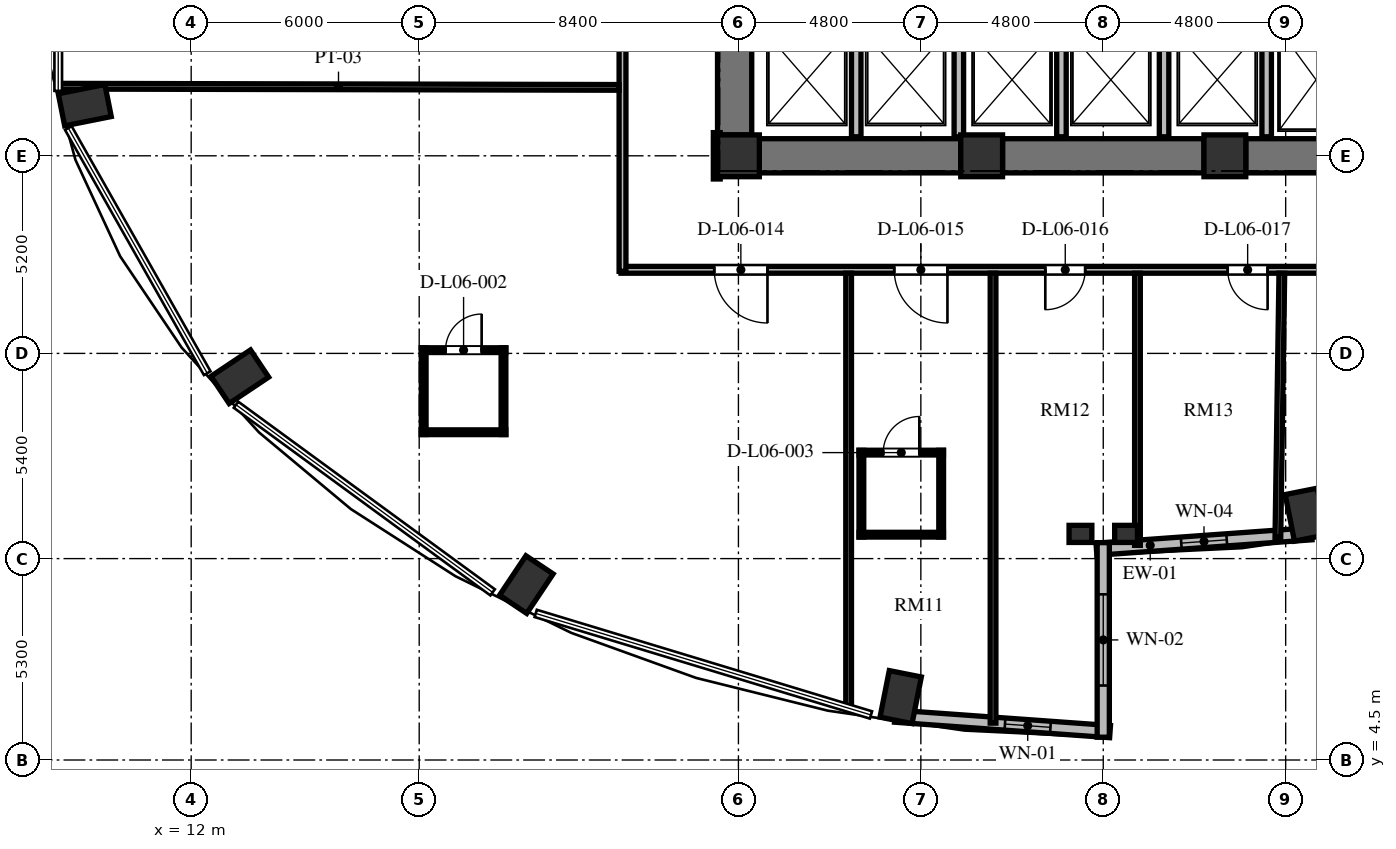
"""IFC4 building model, lengths in metres.
Left out: names, types, materials, properties, quantities, classifications, styles, units other than length and angle.
Written with IfcOpenShell. Run it as: python <this file> out.ifc"""

import sys

from ifc_helpers import new_model, si_unit, direction, frame, frame_2d, origin, origin_2d, place, context, subcontext, project, spatial, rectangle, extrude, element, fill, save


model = new_model("IFC4")
c1 = context("Model", 3, precision=1e-05, world=origin(), true_north=direction((0.0, 1.0)))
c2 = subcontext(c1, "Body", "Model", "MODEL_VIEW")
j1 = project(units=[si_unit("LENGTHUNIT", "METRE"), si_unit("PLANEANGLEUNIT", "RADIAN")], contexts=[c1])
p1 = place(None, origin())
s1 = spatial("IfcSite", under=j1, at=p1, CompositionType="ELEMENT")
p2 = place(p1, origin())
s2 = spatial("IfcBuilding", under=s1, at=p2, CompositionType="ELEMENT")
p3 = place(p2, frame((0.0, 0.0, 28.848)))
s3 = spatial("IfcBuildingStorey", under=s2, at=p3, CompositionType="ELEMENT", Elevation=28.848)
for number, where, z_axis, x_axis in (
    (1, (41.331, 10.956, 0.0), (0.0, 0.0, 1.0), (0.195, -0.981, 0.0)),
    (2, (9.2, 21.732, 0.0), (0.0, 0.0, 1.0), (-0.981, -0.195, 0.0)),
    (3, (13.28, 14.586, 0.0), (0.0, 0.0, 1.0), (-0.831, -0.556, 0.0)),
    (4, (20.819, 9.116, 0.0), (0.0, 0.0, 1.0), (-0.556, -0.831, 0.0)),
    (5, (30.669, 6.156, 0.0), (0.0, 0.0, 1.0), (-0.195, -0.981, 0.0)),
):
    element("IfcColumn", number, at=place(p3, frame(where, z_axis=z_axis, x_axis=x_axis)), inside=s3, PredefinedType="COLUMN", context=c2, shape_type="SweptSolid", body=[
        extrude(rectangle(XDim=1.25, YDim=0.86, at=origin_2d()), origin(), (0.0, 0.0, 1.0), 3.648),
    ])
for number, where, z_axis, x_axis in (
    (6, (26.4, 20.4, 0.0), (0.0, 0.0, 1.0), (1.0, 0.0, 0.0)),
    (7, (32.8, 20.4, 0.0), (0.0, 0.0, 1.0), (1.0, 0.0, 0.0)),
    (8, (39.2, 20.4, 0.0), (0.0, 0.0, 1.0), (1.0, 0.0, 0.0)),
):
    element("IfcColumn", number, at=place(p3, frame(where, z_axis=z_axis, x_axis=x_axis)), inside=s3, PredefinedType="COLUMN", context=c2, shape_type="SweptSolid", body=[
        extrude(rectangle(XDim=1.1, YDim=1.1, at=origin_2d()), origin(), (0.0, 0.0, 1.0), 3.648),
    ])
for number, where, z_axis, x_axis in (
    (9, (35.4, 10.45, 0.0), (0.0, 0.0, 1.0), (1.0, 0.0, 0.0)),
    (10, (36.6, 10.45, 0.0), (0.0, 0.0, 1.0), (1.0, 0.0, 0.0)),
):
    element("IfcColumn", number, at=place(p3, frame(where, z_axis=z_axis, x_axis=x_axis)), inside=s3, PredefinedType="PILASTER", context=c2, shape_type="SweptSolid", body=[
        extrude(rectangle(XDim=0.6, YDim=0.45, at=origin_2d()), origin(), (0.0, 0.0, 1.0), 3.648),
    ])
p4 = place(p3, frame((26.3, 20.95, 0.0), z_axis=(0.0, 0.0, 1.0), x_axis=(0.0, 1.0, 0.0)))
e11 = element("IfcWall", 11, at=p4, inside=s3, PredefinedType="SHEAR", context=c2, shape_type="SweptSolid", body=[
    extrude(rectangle(XDim=14.1, YDim=0.9, at=frame_2d((7.05, 0.0))), origin(), (0.0, 0.0, 1.0), 3.648),
])
p5 = place(p4, frame((6.5, 0.0, 0.0)))
e12 = element("IfcOpeningElement", 12, at=p5, cuts=e11, PredefinedType="OPENING", context=c2, shape_type="SweptSolid", body=[
    extrude(rectangle(XDim=1.2, YDim=2.15, at=frame_2d((0.6, 1.075))), frame((0.0, 0.46, 0.0), z_axis=(0.0, -1.0, 0.0), x_axis=(1.0, 0.0, 0.0)), (0.0, 0.0, 1.0), 0.92),
])
p6 = place(p4, frame((9.6, 0.0, 0.0)))
e13 = element("IfcOpeningElement", 13, at=p6, cuts=e11, PredefinedType="OPENING", context=c2, shape_type="SweptSolid", body=[
    extrude(rectangle(XDim=1.3, YDim=2.2, at=frame_2d((0.65, 1.1))), frame((0.0, 0.46, 0.0), z_axis=(0.0, -1.0, 0.0), x_axis=(1.0, 0.0, 0.0)), (0.0, 0.0, 1.0), 0.92),
])
p7 = place(p4, frame((3.26, 0.0, 0.0)))
e14 = element("IfcOpeningElement", 14, at=p7, cuts=e11, PredefinedType="OPENING", context=c2, shape_type="SweptSolid", body=[
    extrude(rectangle(XDim=1.3, YDim=2.2, at=frame_2d((0.65, 1.1))), frame((0.0, 0.46, 0.0), z_axis=(0.0, -1.0, 0.0), x_axis=(1.0, 0.0, 0.0)), (0.0, 0.0, 1.0), 0.92),
])
p8 = place(p3, frame((26.95, 20.4, 0.0), z_axis=(0.0, 0.0, 1.0), x_axis=(1.0, 0.0, 0.0)))
e15 = element("IfcWall", 15, at=p8, inside=s3, PredefinedType="SHEAR", context=c2, shape_type="SweptSolid", body=[
    extrude(rectangle(XDim=5.3, YDim=0.9, at=frame_2d((2.65, 0.0))), origin(), (0.0, 0.0, 1.0), 3.648),
])
p9 = place(p3, frame((33.35, 20.4, 0.0), z_axis=(0.0, 0.0, 1.0), x_axis=(1.0, 0.0, 0.0)))
e16 = element("IfcWall", 16, at=p9, inside=s3, PredefinedType="SHEAR", context=c2, shape_type="SweptSolid", body=[
    extrude(rectangle(XDim=5.3, YDim=0.9, at=frame_2d((2.65, 0.0))), origin(), (0.0, 0.0, 1.0), 3.648),
])
p10 = place(p3, frame((39.75, 20.4, 0.0), z_axis=(0.0, 0.0, 1.0), x_axis=(1.0, 0.0, 0.0)))
e17 = element("IfcWall", 17, at=p10, inside=s3, PredefinedType="SHEAR", context=c2, shape_type="SweptSolid", body=[
    extrude(rectangle(XDim=5.3, YDim=0.9, at=frame_2d((2.65, 0.0))), origin(), (0.0, 0.0, 1.0), 3.648),
])
p11 = place(p3, frame((35.821, 10.047, 0.0), z_axis=(0.0, 0.0, 1.0), x_axis=(0.997422321809, 0.071754525696, 0.0)))
e18 = element("IfcWall", 18, at=p11, inside=s3, PredefinedType="SOLIDWALL", context=c2, shape_type="SweptSolid", body=[
    extrude(rectangle(XDim=5.675, YDim=0.32, at=frame_2d((2.838, 0.0))), origin(), (0.0, 0.0, 1.0), 3.428),
])
p12 = place(p11, frame((2.238, 0.0, 0.85)))
e19 = element("IfcOpeningElement", 19, at=p12, cuts=e18, PredefinedType="OPENING", context=c2, shape_type="SweptSolid", body=[
    extrude(rectangle(XDim=1.2, YDim=1.8, at=frame_2d((0.6, 0.9))), frame((0.0, 0.17, 0.0), z_axis=(0.0, -1.0, 0.0), x_axis=(1.0, 0.0, 0.0)), (0.0, 0.0, 1.0), 0.34),
])
p13 = place(p3, frame((30.519, 5.654, 0.0), z_axis=(0.0, 0.0, 1.0), x_axis=(0.997421878774, -0.071760683825, 0.0)))
e20 = element("IfcWall", 20, at=p13, inside=s3, PredefinedType="SOLIDWALL", context=c2, shape_type="SweptSolid", body=[
    extrude(rectangle(XDim=5.675, YDim=0.32, at=frame_2d((2.837, 0.0))), origin(), (0.0, 0.0, 1.0), 3.428),
])
p14 = place(p13, frame((2.903, 0.0, 0.85)))
e21 = element("IfcOpeningElement", 21, at=p14, cuts=e20, PredefinedType="OPENING", context=c2, shape_type="SweptSolid", body=[
    extrude(rectangle(XDim=1.2, YDim=2.2, at=frame_2d((0.6, 1.1))), frame((0.0, 0.17, 0.0), z_axis=(0.0, -1.0, 0.0), x_axis=(1.0, 0.0, 0.0)), (0.0, 0.0, 1.0), 0.34),
])
p15 = place(p3, frame((36.0, 5.1, 0.0), z_axis=(0.0, 0.0, 1.0), x_axis=(0.0, 1.0, 0.0)))
e22 = element("IfcWall", 22, at=p15, inside=s3, PredefinedType="SOLIDWALL", context=c2, shape_type="SweptSolid", body=[
    extrude(rectangle(XDim=5.12, YDim=0.32, at=frame_2d((2.56, 0.0))), origin(), (0.0, 0.0, 1.0), 3.428),
])
p16 = place(p15, frame((1.36, 0.0, 0.84)))
e23 = element("IfcOpeningElement", 23, at=p16, cuts=e22, PredefinedType="OPENING", context=c2, shape_type="SweptSolid", body=[
    extrude(rectangle(XDim=2.4, YDim=2.04, at=frame_2d((1.2, 1.02))), frame((0.0, 0.17, 0.0), z_axis=(0.0, -1.0, 0.0), x_axis=(1.0, 0.0, 0.0)), (0.0, 0.0, 1.0), 0.34),
])
for number, where, z_axis, x_axis in (
    (24, (29.5, 20.9, 0.0), (0.0, 0.0, 1.0), (0.0, 1.0, 0.0)),
    (25, (32.2, 20.9, 0.0), (0.0, 0.0, 1.0), (0.0, 1.0, 0.0)),
    (26, (34.9, 20.9, 0.0), (0.0, 0.0, 1.0), (0.0, 1.0, 0.0)),
    (27, (37.6, 20.9, 0.0), (0.0, 0.0, 1.0), (0.0, 1.0, 0.0)),
    (28, (40.3, 20.9, 0.0), (0.0, 0.0, 1.0), (0.0, 1.0, 0.0)),
):
    element("IfcWall", number, at=place(p3, frame(where, z_axis=z_axis, x_axis=x_axis)), inside=s3, PredefinedType="SOLIDWALL", context=c2, shape_type="SweptSolid", body=[
        extrude(rectangle(XDim=2.8, YDim=0.25, at=frame_2d((1.4, 0.0))), origin(), (0.0, 0.0, 1.0), 3.428),
    ])
p17 = place(p3, frame((25.83, 21.01, 0.0), z_axis=(0.0, 0.0, 1.0), x_axis=(0.0, -1.0, 0.0)))
e29 = element("IfcWall", 29, at=p17, inside=s3, PredefinedType="PARTITIONING", context=c2, shape_type="SweptSolid", body=[
    extrude(rectangle(XDim=1.22, YDim=0.18, at=frame_2d((0.61, 0.0))), origin(), (0.0, 0.0, 1.0), 3.428),
])
p18 = place(p3, frame((45.24, 17.4, 0.0), z_axis=(0.0, 0.0, 1.0), x_axis=(-1.0, 0.0, 0.0)))
e30 = element("IfcWall", 30, at=p18, inside=s3, PredefinedType="PARTITIONING", context=c2, shape_type="SweptSolid", body=[
    extrude(rectangle(XDim=21.93, YDim=0.18, at=frame_2d((10.965, 0.0))), origin(), (0.0, 0.0, 1.0), 3.053),
])
p19 = place(p18, frame((18.076, 0.0, 0.0)))
e31 = element("IfcOpeningElement", 31, at=p19, cuts=e30, PredefinedType="OPENING", context=c2, shape_type="SweptSolid", body=[
    extrude(rectangle(XDim=1.4, YDim=2.2, at=frame_2d((0.7, 1.1))), frame((0.0, 0.1, 0.0), z_axis=(0.0, -1.0, 0.0), x_axis=(1.0, 0.0, 0.0)), (0.0, 0.0, 1.0), 0.2),
])
p20 = place(p18, frame((13.34, 0.0, 0.0)))
e32 = element("IfcOpeningElement", 32, at=p20, cuts=e30, PredefinedType="OPENING", context=c2, shape_type="SweptSolid", body=[
    extrude(rectangle(XDim=1.4, YDim=2.2, at=frame_2d((0.7, 1.1))), frame((0.0, 0.1, 0.0), z_axis=(0.0, -1.0, 0.0), x_axis=(1.0, 0.0, 0.0)), (0.0, 0.0, 1.0), 0.2),
])
p21 = place(p18, frame((9.715, 0.0, 0.0)))
e33 = element("IfcOpeningElement", 33, at=p21, cuts=e30, PredefinedType="OPENING", context=c2, shape_type="SweptSolid", body=[
    extrude(rectangle(XDim=1.05, YDim=2.15, at=frame_2d((0.525, 1.075))), frame((0.0, 0.1, 0.0), z_axis=(0.0, -1.0, 0.0), x_axis=(1.0, 0.0, 0.0)), (0.0, 0.0, 1.0), 0.2),
])
p22 = place(p18, frame((4.916, 0.0, 0.0)))
e34 = element("IfcOpeningElement", 34, at=p22, cuts=e30, PredefinedType="OPENING", context=c2, shape_type="SweptSolid", body=[
    extrude(rectangle(XDim=1.05, YDim=2.15, at=frame_2d((0.525, 1.075))), frame((0.0, 0.1, 0.0), z_axis=(0.0, -1.0, 0.0), x_axis=(1.0, 0.0, 0.0)), (0.0, 0.0, 1.0), 0.2),
])
p23 = place(p18, frame((1.729, 0.0, 0.0)))
e35 = element("IfcOpeningElement", 35, at=p23, cuts=e30, PredefinedType="OPENING", context=c2, shape_type="SweptSolid", body=[
    extrude(rectangle(XDim=1.4, YDim=2.2, at=frame_2d((0.7, 1.1))), frame((0.0, 0.1, 0.0), z_axis=(0.0, -1.0, 0.0), x_axis=(1.0, 0.0, 0.0)), (0.0, 0.0, 1.0), 0.2),
])
p24 = place(p3, frame((23.35, 17.36, 0.0), z_axis=(0.0, 0.0, 1.0), x_axis=(0.0, 1.0, 0.0)))
e36 = element("IfcWall", 36, at=p24, inside=s3, PredefinedType="PARTITIONING", context=c2, shape_type="SweptSolid", body=[
    extrude(rectangle(XDim=9.28, YDim=0.18, at=frame_2d((4.64, 0.0))), origin(), (0.0, 0.0, 1.0), 3.428),
])
p25 = place(p3, frame((8.493, 22.231, 0.0), z_axis=(0.0, 0.0, 1.0), x_axis=(0.999997760873, -0.002116187438, 0.0)))
e37 = element("IfcWall", 37, at=p25, inside=s3, PredefinedType="PARTITIONING", context=c2, shape_type="SweptSolid", body=[
    extrude(rectangle(XDim=14.767, YDim=0.15, at=frame_2d((7.384, 0.0))), origin(), (0.0, 0.0, 1.0), 3.428),
])
p26 = place(p3, frame((29.3, 5.876, 0.0), z_axis=(0.0, 0.0, 1.0), x_axis=(0.0, 1.0, 0.0)))
e38 = element("IfcWall", 38, at=p26, inside=s3, PredefinedType="PARTITIONING", context=c2, shape_type="SweptSolid", body=[
    extrude(rectangle(XDim=11.434, YDim=0.15, at=frame_2d((5.717, 0.0))), origin(), (0.0, 0.0, 1.0), 3.428),
])
p27 = place(p3, frame((33.1, 5.471, 0.0), z_axis=(0.0, 0.0, 1.0), x_axis=(0.0, 1.0, 0.0)))
e39 = element("IfcWall", 39, at=p27, inside=s3, PredefinedType="PARTITIONING", context=c2, shape_type="SweptSolid", body=[
    extrude(rectangle(XDim=11.839, YDim=0.15, at=frame_2d((5.919, 0.0))), origin(), (0.0, 0.0, 1.0), 3.428),
])
p28 = place(p3, frame((36.9, 10.15, 0.0), z_axis=(0.0, 0.0, 1.0), x_axis=(0.0, 1.0, 0.0)))
e40 = element("IfcWall", 40, at=p28, inside=s3, PredefinedType="PARTITIONING", context=c2, shape_type="SweptSolid", body=[
    extrude(rectangle(XDim=7.16, YDim=0.15, at=frame_2d((3.58, 0.0))), origin(), (0.0, 0.0, 1.0), 3.428),
])
p29 = place(p3, frame((40.595, 10.359, 0.0), z_axis=(0.0, 0.0, 1.0), x_axis=(0.014960393547, 0.99988808705, 0.0)))
e41 = element("IfcWall", 41, at=p29, inside=s3, PredefinedType="PARTITIONING", context=c2, shape_type="SweptSolid", body=[
    extrude(rectangle(XDim=6.952, YDim=0.15, at=frame_2d((3.476, 0.0))), origin(), (0.0, 0.0, 1.0), 2.813),
])
p30 = place(p3, frame((18.058, 15.285, 0.0), z_axis=(0.0, 0.0, 1.0), x_axis=(1.0, 0.0, 0.0)))
e42 = element("IfcWall", 42, at=p30, inside=s3, PredefinedType="PARTITIONING", context=c2, shape_type="SweptSolid", body=[
    extrude(rectangle(XDim=2.22, YDim=0.125, at=frame_2d((1.11, 0.0))), origin(), (0.0, 0.0, 1.0), 3.428),
])
p31 = place(p30, frame((0.635, 0.0, 0.0)))
e43 = element("IfcOpeningElement", 43, at=p31, cuts=e42, PredefinedType="OPENING", context=c2, shape_type="SweptSolid", body=[
    extrude(rectangle(XDim=0.95, YDim=2.1, at=frame_2d((0.475, 1.05))), frame((0.0, 0.073, 0.0), z_axis=(0.0, -1.0, 0.0), x_axis=(1.0, 0.0, 0.0)), (0.0, 0.0, 1.0), 0.145),
])
p32 = place(p3, frame((18.058, 13.125, 0.0), z_axis=(0.0, 0.0, 1.0), x_axis=(1.0, 0.0, 0.0)))
e44 = element("IfcWall", 44, at=p32, inside=s3, PredefinedType="PARTITIONING", context=c2, shape_type="SweptSolid", body=[
    extrude(rectangle(XDim=2.22, YDim=0.125, at=frame_2d((1.11, 0.0))), origin(), (0.0, 0.0, 1.0), 3.428),
])
for number, where, z_axis, x_axis in (
    (45, (20.218, 13.065, 0.0), (0.0, 0.0, 1.0), (0.0, 1.0, 0.0)),
    (46, (18.118, 13.065, 0.0), (0.0, 0.0, 1.0), (0.0, 1.0, 0.0)),
):
    element("IfcWall", number, at=place(p3, frame(where, z_axis=z_axis, x_axis=x_axis)), inside=s3, PredefinedType="PARTITIONING", context=c2, shape_type="SweptSolid", body=[
        extrude(rectangle(XDim=2.28, YDim=0.125, at=frame_2d((1.14, 0.0))), origin(), (0.0, 0.0, 1.0), 3.428),
    ])
p33 = place(p3, frame((29.575, 12.589, 0.0), z_axis=(0.0, 0.0, 1.0), x_axis=(1.0, 0.0, 0.0)))
e47 = element("IfcWall", 47, at=p33, inside=s3, PredefinedType="PARTITIONING", context=c2, shape_type="SweptSolid", body=[
    extrude(rectangle(XDim=2.22, YDim=0.125, at=frame_2d((1.11, 0.0))), origin(), (0.0, 0.0, 1.0), 3.428),
])
p34 = place(p33, frame((0.635, 0.0, 0.0)))
e48 = element("IfcOpeningElement", 48, at=p34, cuts=e47, PredefinedType="OPENING", context=c2, shape_type="SweptSolid", body=[
    extrude(rectangle(XDim=0.95, YDim=2.1, at=frame_2d((0.475, 1.05))), frame((0.0, 0.073, 0.0), z_axis=(0.0, -1.0, 0.0), x_axis=(1.0, 0.0, 0.0)), (0.0, 0.0, 1.0), 0.145),
])
p35 = place(p3, frame((29.575, 10.429, 0.0), z_axis=(0.0, 0.0, 1.0), x_axis=(1.0, 0.0, 0.0)))
e49 = element("IfcWall", 49, at=p35, inside=s3, PredefinedType="PARTITIONING", context=c2, shape_type="SweptSolid", body=[
    extrude(rectangle(XDim=2.22, YDim=0.125, at=frame_2d((1.11, 0.0))), origin(), (0.0, 0.0, 1.0), 3.428),
])
p36 = place(p3, frame((31.735, 10.369, 0.0), z_axis=(0.0, 0.0, 1.0), x_axis=(0.0, 1.0, 0.0)))
e50 = element("IfcWall", 50, at=p36, inside=s3, PredefinedType="PARTITIONING", context=c2, shape_type="SweptSolid", body=[
    extrude(rectangle(XDim=2.28, YDim=0.125, at=frame_2d((1.14, 0.0))), origin(), (0.0, 0.0, 1.0), 2.813),
])
p37 = place(p3, frame((29.635, 10.369, 0.0), z_axis=(0.0, 0.0, 1.0), x_axis=(0.0, 1.0, 0.0)))
e51 = element("IfcWall", 51, at=p37, inside=s3, PredefinedType="PARTITIONING", context=c2, shape_type="SweptSolid", body=[
    extrude(rectangle(XDim=2.28, YDim=0.125, at=frame_2d((1.14, 0.0))), origin(), (0.0, 0.0, 1.0), 3.428),
])
p38 = place(p12, origin())
e52 = element("IfcWindow", 52, at=p38, inside=s3, PartitioningType="SINGLE_PANEL", PredefinedType="WINDOW", context=c2, shape_type="SweptSolid", body=[
    extrude(rectangle(XDim=1.2, YDim=1.8, at=frame_2d((0.6, 0.9))), frame((0.0, 0.03, 0.0), z_axis=(0.0, -1.0, 0.0), x_axis=(1.0, 0.0, 0.0)), (0.0, 0.0, 1.0), 0.06),
])
fill(e19, e52)
p39 = place(p14, origin())
e53 = element("IfcWindow", 53, at=p39, inside=s3, PartitioningType="SINGLE_PANEL", PredefinedType="WINDOW", context=c2, shape_type="SweptSolid", body=[
    extrude(rectangle(XDim=1.2, YDim=2.2, at=frame_2d((0.6, 1.1))), frame((0.0, 0.03, 0.0), z_axis=(0.0, -1.0, 0.0), x_axis=(1.0, 0.0, 0.0)), (0.0, 0.0, 1.0), 0.06),
])
fill(e21, e53)
p40 = place(p16, origin())
e54 = element("IfcWindow", 54, at=p40, inside=s3, PartitioningType="SINGLE_PANEL", PredefinedType="WINDOW", context=c2, shape_type="SweptSolid", body=[
    extrude(rectangle(XDim=2.4, YDim=2.04, at=frame_2d((1.2, 1.02))), frame((0.0, 0.03, 0.0), z_axis=(0.0, -1.0, 0.0), x_axis=(1.0, 0.0, 0.0)), (0.0, 0.0, 1.0), 0.06),
])
fill(e23, e54)
p41 = place(p31, origin())
e55 = element("IfcDoor", 55, at=p41, inside=s3, OperationType="SINGLE_SWING_RIGHT", PredefinedType="DOOR", context=c2, shape_type="SweptSolid", body=[
    extrude(rectangle(XDim=0.95, YDim=2.1, at=frame_2d((0.475, 1.05))), frame((0.0, 0.025, 0.0), z_axis=(0.0, -1.0, 0.0), x_axis=(1.0, 0.0, 0.0)), (0.0, 0.0, 1.0), 0.05),
])
fill(e43, e55)
p42 = place(p19, origin())
e56 = element("IfcDoor", 56, at=p42, inside=s3, OperationType="SINGLE_SWING_LEFT", PredefinedType="DOOR", context=c2, shape_type="SweptSolid", body=[
    extrude(rectangle(XDim=1.4, YDim=2.2, at=frame_2d((0.7, 1.1))), frame((0.0, 0.025, 0.0), z_axis=(0.0, -1.0, 0.0), x_axis=(1.0, 0.0, 0.0)), (0.0, 0.0, 1.0), 0.05),
])
fill(e31, e56)
p43 = place(p34, origin())
e57 = element("IfcDoor", 57, at=p43, inside=s3, OperationType="SINGLE_SWING_RIGHT", PredefinedType="DOOR", context=c2, shape_type="SweptSolid", body=[
    extrude(rectangle(XDim=0.95, YDim=2.1, at=frame_2d((0.475, 1.05))), frame((0.0, 0.025, 0.0), z_axis=(0.0, -1.0, 0.0), x_axis=(1.0, 0.0, 0.0)), (0.0, 0.0, 1.0), 0.05),
])
fill(e48, e57)
p44 = place(p20, origin())
e58 = element("IfcDoor", 58, at=p44, inside=s3, OperationType="SINGLE_SWING_LEFT", PredefinedType="DOOR", context=c2, shape_type="SweptSolid", body=[
    extrude(rectangle(XDim=1.4, YDim=2.2, at=frame_2d((0.7, 1.1))), frame((0.0, 0.025, 0.0), z_axis=(0.0, -1.0, 0.0), x_axis=(1.0, 0.0, 0.0)), (0.0, 0.0, 1.0), 0.05),
])
fill(e32, e58)
p45 = place(p21, origin())
e59 = element("IfcDoor", 59, at=p45, inside=s3, OperationType="SINGLE_SWING_RIGHT", PredefinedType="DOOR", context=c2, shape_type="SweptSolid", body=[
    extrude(rectangle(XDim=1.05, YDim=2.15, at=frame_2d((0.525, 1.075))), frame((0.0, 0.025, 0.0), z_axis=(0.0, -1.0, 0.0), x_axis=(1.0, 0.0, 0.0)), (0.0, 0.0, 1.0), 0.05),
])
fill(e33, e59)
p46 = place(p22, origin())
e60 = element("IfcDoor", 60, at=p46, inside=s3, OperationType="SINGLE_SWING_LEFT", PredefinedType="DOOR", context=c2, shape_type="SweptSolid", body=[
    extrude(rectangle(XDim=1.05, YDim=2.15, at=frame_2d((0.525, 1.075))), frame((0.0, 0.025, 0.0), z_axis=(0.0, -1.0, 0.0), x_axis=(1.0, 0.0, 0.0)), (0.0, 0.0, 1.0), 0.05),
])
fill(e34, e60)
save(model, sys.argv[1])
